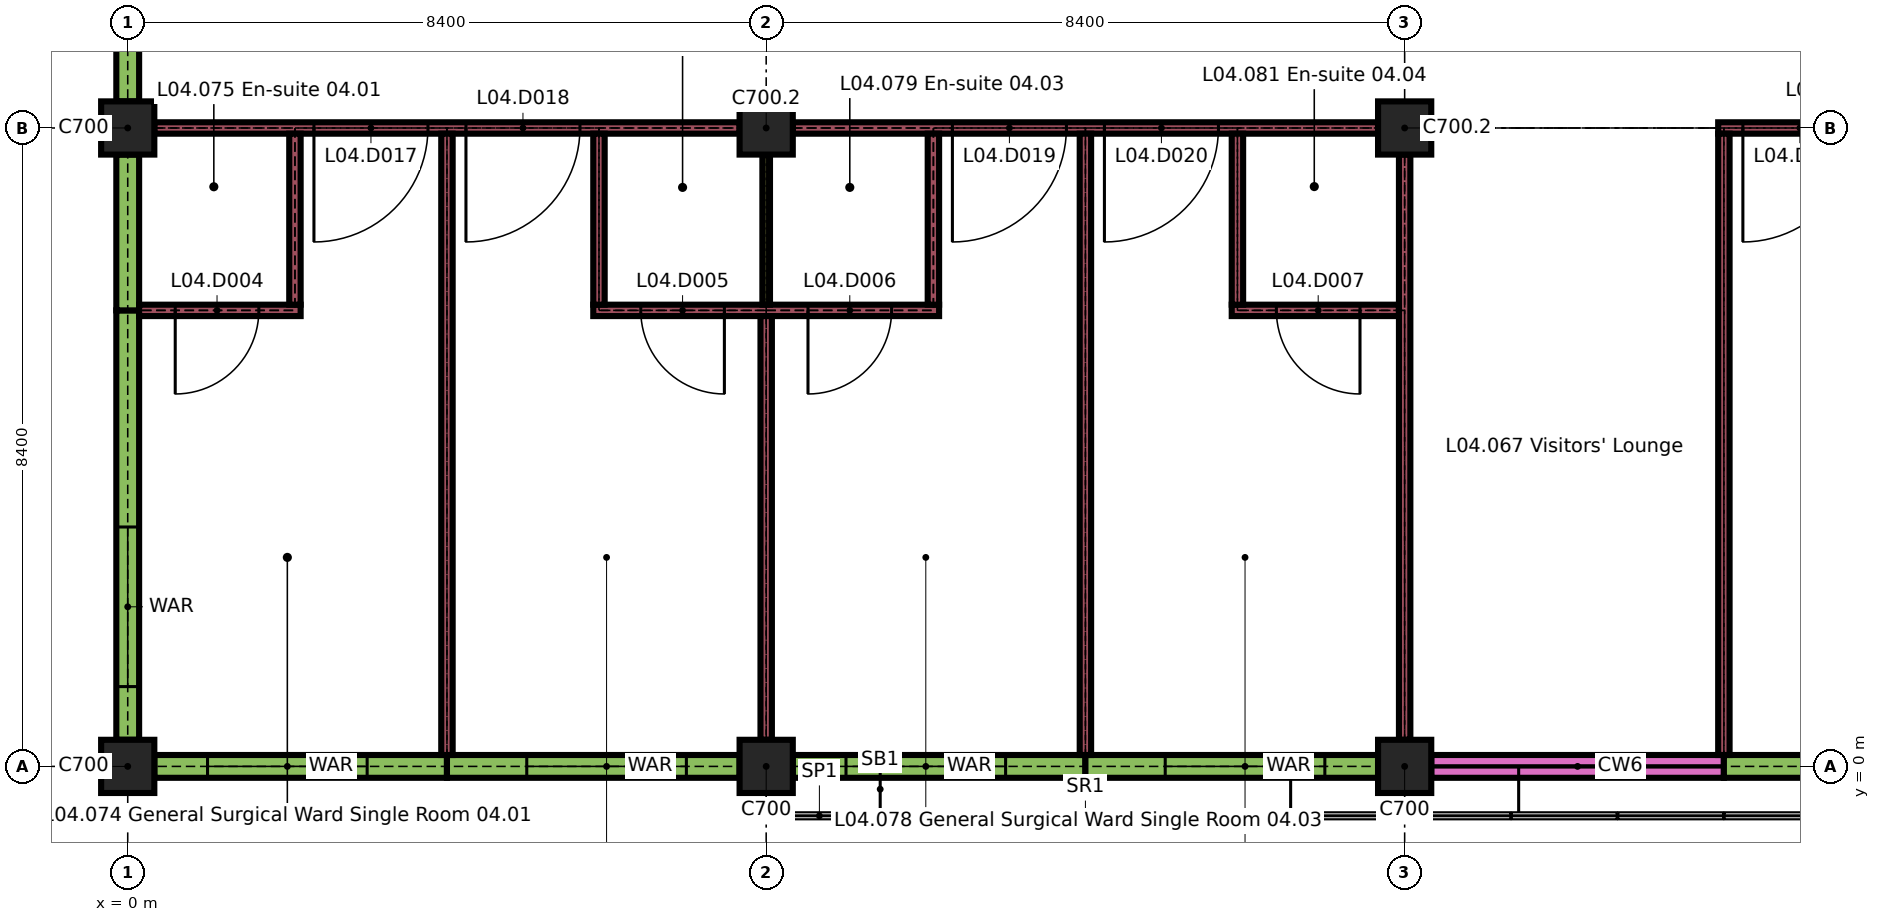
"""IFC4 building model, lengths in metres.
Left out: names, types, materials, properties, quantities, classifications, styles, units other than length and angle.
Written with IfcOpenShell. Run it as: python <this file> out.ifc"""

import sys

from ifc_helpers import new_model, si_unit, direction, frame, frame_2d, origin, origin_2d, place, context, subcontext, project, spatial, rectangle, extrude, element, fill, save


model = new_model("IFC4")
c1 = context("Model", 3, precision=1e-05, world=origin(), true_north=direction((0.0, 1.0)))
c2 = subcontext(c1, "Body", "Model", "MODEL_VIEW")
j1 = project(units=[si_unit("LENGTHUNIT", "METRE"), si_unit("PLANEANGLEUNIT", "RADIAN")], contexts=[c1])
p1 = place(None, origin())
s1 = spatial("IfcSite", under=j1, at=p1, CompositionType="ELEMENT")
p2 = place(p1, origin())
s2 = spatial("IfcBuilding", under=s1, at=p2, CompositionType="ELEMENT")
p3 = place(p2, frame((0.0, 0.0, 18.9)))
s3 = spatial("IfcBuildingStorey", under=s2, at=p3, CompositionType="ELEMENT", Elevation=18.9)
for number, where, z_axis, x_axis in (
    (1, (0.0, 0.0, 0.0), (0.0, 0.0, 1.0), (1.0, 0.0, 0.0)),
    (2, (8.4, 0.0, 0.0), (0.0, 0.0, 1.0), (1.0, 0.0, 0.0)),
    (3, (16.8, 0.0, 0.0), (0.0, 0.0, 1.0), (1.0, 0.0, 0.0)),
    (4, (0.0, 8.4, 0.0), (0.0, 0.0, 1.0), (1.0, 0.0, 0.0)),
    (5, (8.4, 8.4, 0.0), (0.0, 0.0, 1.0), (1.0, 0.0, 0.0)),
    (6, (16.8, 8.4, 0.0), (0.0, 0.0, 1.0), (1.0, 0.0, 0.0)),
):
    element("IfcColumn", number, at=place(p3, frame(where, z_axis=z_axis, x_axis=x_axis)), inside=s3, PredefinedType="COLUMN", context=c2, shape_type="SweptSolid", body=[
        extrude(rectangle(XDim=0.7, YDim=0.7, at=origin_2d()), origin(), (0.0, 0.0, 1.0), 3.26),
    ])
p4 = place(p3, frame((0.35, 0.0, 0.0), z_axis=(0.0, 0.0, 1.0), x_axis=(1.0, 0.0, 0.0)))
e7 = element("IfcWall", 7, at=p4, inside=s3, PredefinedType="SOLIDWALL", context=c2, shape_type="SweptSolid", body=[
    extrude(rectangle(XDim=3.85, YDim=0.3, at=frame_2d((1.925, 0.0))), origin(), (0.0, 0.0, 1.0), 2.96),
])
p5 = place(p4, frame((0.7, 0.0, 0.9)))
e8 = element("IfcOpeningElement", 8, at=p5, cuts=e7, PredefinedType="OPENING", context=c2, shape_type="SweptSolid", body=[
    extrude(rectangle(XDim=2.1, YDim=1.5, at=frame_2d((1.05, 0.75))), frame((0.0, 0.16, 0.0), z_axis=(0.0, -1.0, 0.0), x_axis=(1.0, 0.0, 0.0)), (0.0, 0.0, 1.0), 0.32),
])
p6 = place(p3, frame((4.2, 0.0, 0.0), z_axis=(0.0, 0.0, 1.0), x_axis=(1.0, 0.0, 0.0)))
e9 = element("IfcWall", 9, at=p6, inside=s3, PredefinedType="SOLIDWALL", context=c2, shape_type="SweptSolid", body=[
    extrude(rectangle(XDim=3.85, YDim=0.3, at=frame_2d((1.925, 0.0))), origin(), (0.0, 0.0, 1.0), 2.96),
])
p7 = place(p6, frame((1.05, 0.0, 0.9)))
e10 = element("IfcOpeningElement", 10, at=p7, cuts=e9, PredefinedType="OPENING", context=c2, shape_type="SweptSolid", body=[
    extrude(rectangle(XDim=2.1, YDim=1.5, at=frame_2d((1.05, 0.75))), frame((0.0, 0.16, 0.0), z_axis=(0.0, -1.0, 0.0), x_axis=(1.0, 0.0, 0.0)), (0.0, 0.0, 1.0), 0.32),
])
p8 = place(p3, frame((8.75, 0.0, 0.0), z_axis=(0.0, 0.0, 1.0), x_axis=(1.0, 0.0, 0.0)))
e11 = element("IfcWall", 11, at=p8, inside=s3, PredefinedType="SOLIDWALL", context=c2, shape_type="SweptSolid", body=[
    extrude(rectangle(XDim=3.85, YDim=0.3, at=frame_2d((1.925, 0.0))), origin(), (0.0, 0.0, 1.0), 2.96),
])
p9 = place(p8, frame((0.7, 0.0, 0.9)))
e12 = element("IfcOpeningElement", 12, at=p9, cuts=e11, PredefinedType="OPENING", context=c2, shape_type="SweptSolid", body=[
    extrude(rectangle(XDim=2.1, YDim=1.5, at=frame_2d((1.05, 0.75))), frame((0.0, 0.16, 0.0), z_axis=(0.0, -1.0, 0.0), x_axis=(1.0, 0.0, 0.0)), (0.0, 0.0, 1.0), 0.32),
])
p10 = place(p3, frame((12.6, 0.0, 0.0), z_axis=(0.0, 0.0, 1.0), x_axis=(1.0, 0.0, 0.0)))
e13 = element("IfcWall", 13, at=p10, inside=s3, PredefinedType="SOLIDWALL", context=c2, shape_type="SweptSolid", body=[
    extrude(rectangle(XDim=3.85, YDim=0.3, at=frame_2d((1.925, 0.0))), origin(), (0.0, 0.0, 1.0), 2.96),
])
p11 = place(p10, frame((1.05, 0.0, 0.9)))
e14 = element("IfcOpeningElement", 14, at=p11, cuts=e13, PredefinedType="OPENING", context=c2, shape_type="SweptSolid", body=[
    extrude(rectangle(XDim=2.1, YDim=1.5, at=frame_2d((1.05, 0.75))), frame((0.0, 0.16, 0.0), z_axis=(0.0, -1.0, 0.0), x_axis=(1.0, 0.0, 0.0)), (0.0, 0.0, 1.0), 0.32),
])
p12 = place(p3, frame((17.15, 0.0, 0.0), z_axis=(0.0, 0.0, 1.0), x_axis=(1.0, 0.0, 0.0)))
e15 = element("IfcWall", 15, at=p12, inside=s3, PredefinedType="SOLIDWALL", context=c2, shape_type="SweptSolid", body=[
    extrude(rectangle(XDim=3.85, YDim=0.3, at=frame_2d((1.925, 0.0))), origin(), (0.0, 0.0, 1.0), 0.6),
])
p13 = place(p3, frame((21.0, 0.0, 0.0), z_axis=(0.0, 0.0, 1.0), x_axis=(1.0, 0.0, 0.0)))
e16 = element("IfcWall", 16, at=p13, inside=s3, PredefinedType="SOLIDWALL", context=c2, shape_type="SweptSolid", body=[
    extrude(rectangle(XDim=3.85, YDim=0.3, at=frame_2d((1.925, 0.0))), origin(), (0.0, 0.0, 1.0), 2.96),
])
p14 = place(p13, frame((1.05, 0.0, 0.9)))
e17 = element("IfcOpeningElement", 17, at=p14, cuts=e16, PredefinedType="OPENING", context=c2, shape_type="SweptSolid", body=[
    extrude(rectangle(XDim=2.1, YDim=1.5, at=frame_2d((1.05, 0.75))), frame((0.0, 0.16, 0.0), z_axis=(0.0, -1.0, 0.0), x_axis=(1.0, 0.0, 0.0)), (0.0, 0.0, 1.0), 0.32),
])
p15 = place(p3, frame((0.0, 0.35, 0.0), z_axis=(0.0, 0.0, 1.0), x_axis=(0.0, 1.0, 0.0)))
e18 = element("IfcWall", 18, at=p15, inside=s3, PredefinedType="SOLIDWALL", context=c2, shape_type="SweptSolid", body=[
    extrude(rectangle(XDim=5.65, YDim=0.3, at=frame_2d((2.825, 0.0))), origin(), (0.0, 0.0, 1.0), 2.96),
])
p16 = place(p15, frame((0.7, 0.0, 0.9)))
e19 = element("IfcOpeningElement", 19, at=p16, cuts=e18, PredefinedType="OPENING", context=c2, shape_type="SweptSolid", body=[
    extrude(rectangle(XDim=2.1, YDim=1.5, at=frame_2d((1.05, 0.75))), frame((0.0, 0.16, 0.0), z_axis=(0.0, -1.0, 0.0), x_axis=(1.0, 0.0, 0.0)), (0.0, 0.0, 1.0), 0.32),
])
p17 = place(p3, frame((0.0, 6.0, 0.0), z_axis=(0.0, 0.0, 1.0), x_axis=(0.0, 1.0, 0.0)))
e20 = element("IfcWall", 20, at=p17, inside=s3, PredefinedType="SOLIDWALL", context=c2, shape_type="SweptSolid", body=[
    extrude(rectangle(XDim=2.05, YDim=0.3, at=frame_2d((1.025, 0.0))), origin(), (0.0, 0.0, 1.0), 2.96),
])
p18 = place(p3, frame((0.0, 8.75, 0.0), z_axis=(0.0, 0.0, 1.0), x_axis=(0.0, 1.0, 0.0)))
e21 = element("IfcWall", 21, at=p18, inside=s3, PredefinedType="SOLIDWALL", context=c2, shape_type="SweptSolid", body=[
    extrude(rectangle(XDim=2.65, YDim=0.3, at=frame_2d((1.325, 0.0))), origin(), (0.0, 0.0, 1.0), 2.96),
])
p19 = place(p18, frame((1.3, 0.0, 0.9)))
e22 = element("IfcOpeningElement", 22, at=p19, cuts=e21, PredefinedType="OPENING", context=c2, shape_type="SweptSolid", body=[
    extrude(rectangle(XDim=0.9, YDim=1.5, at=frame_2d((0.45, 0.75))), frame((0.0, 0.16, 0.0), z_axis=(0.0, -1.0, 0.0), x_axis=(1.0, 0.0, 0.0)), (0.0, 0.0, 1.0), 0.32),
])
p20 = place(p3, frame((0.15, 6.0, 0.0), z_axis=(0.0, 0.0, 1.0), x_axis=(1.0, 0.0, 0.0)))
e23 = element("IfcWall", 23, at=p20, inside=s3, PredefinedType="PARTITIONING", context=c2, shape_type="SweptSolid", body=[
    extrude(rectangle(XDim=2.125, YDim=0.15, at=frame_2d((1.062, 0.0))), origin(), (0.0, 0.0, 1.0), 3.26),
])
p21 = place(p20, frame((0.475, 0.0, 0.0)))
e24 = element("IfcOpeningElement", 24, at=p21, cuts=e23, PredefinedType="OPENING", context=c2, shape_type="SweptSolid", body=[
    extrude(rectangle(XDim=1.1, YDim=2.1, at=frame_2d((0.55, 1.05))), frame((0.0, 0.085, 0.0), z_axis=(0.0, -1.0, 0.0), x_axis=(1.0, 0.0, 0.0)), (0.0, 0.0, 1.0), 0.17),
])
p22 = place(p3, frame((6.125, 6.0, 0.0), z_axis=(0.0, 0.0, 1.0), x_axis=(1.0, 0.0, 0.0)))
e25 = element("IfcWall", 25, at=p22, inside=s3, PredefinedType="PARTITIONING", context=c2, shape_type="SweptSolid", body=[
    extrude(rectangle(XDim=4.55, YDim=0.15, at=frame_2d((2.275, 0.0))), origin(), (0.0, 0.0, 1.0), 3.26),
])
p23 = place(p22, frame((0.625, 0.0, 0.0)))
e26 = element("IfcOpeningElement", 26, at=p23, cuts=e25, PredefinedType="OPENING", context=c2, shape_type="SweptSolid", body=[
    extrude(rectangle(XDim=1.1, YDim=2.1, at=frame_2d((0.55, 1.05))), frame((0.0, 0.085, 0.0), z_axis=(0.0, -1.0, 0.0), x_axis=(1.0, 0.0, 0.0)), (0.0, 0.0, 1.0), 0.17),
])
p24 = place(p22, frame((2.825, 0.0, 0.0)))
e27 = element("IfcOpeningElement", 27, at=p24, cuts=e25, PredefinedType="OPENING", context=c2, shape_type="SweptSolid", body=[
    extrude(rectangle(XDim=1.1, YDim=2.1, at=frame_2d((0.55, 1.05))), frame((0.0, 0.085, 0.0), z_axis=(0.0, -1.0, 0.0), x_axis=(1.0, 0.0, 0.0)), (0.0, 0.0, 1.0), 0.17),
])
p25 = place(p3, frame((14.525, 6.0, 0.0), z_axis=(0.0, 0.0, 1.0), x_axis=(1.0, 0.0, 0.0)))
e28 = element("IfcWall", 28, at=p25, inside=s3, PredefinedType="PARTITIONING", context=c2, shape_type="SweptSolid", body=[
    extrude(rectangle(XDim=2.2, YDim=0.15, at=frame_2d((1.1, 0.0))), origin(), (0.0, 0.0, 1.0), 3.26),
])
p26 = place(p25, frame((0.587, 0.0, 0.0)))
e29 = element("IfcOpeningElement", 29, at=p26, cuts=e28, PredefinedType="OPENING", context=c2, shape_type="SweptSolid", body=[
    extrude(rectangle(XDim=1.1, YDim=2.1, at=frame_2d((0.55, 1.05))), frame((0.0, 0.085, 0.0), z_axis=(0.0, -1.0, 0.0), x_axis=(1.0, 0.0, 0.0)), (0.0, 0.0, 1.0), 0.17),
])
p27 = place(p3, frame((0.35, 8.4, 0.0), z_axis=(0.0, 0.0, 1.0), x_axis=(1.0, 0.0, 0.0)))
e30 = element("IfcWall", 30, at=p27, inside=s3, PredefinedType="PARTITIONING", context=c2, shape_type="SweptSolid", body=[
    extrude(rectangle(XDim=7.7, YDim=0.15, at=frame_2d((3.85, 0.0))), origin(), (0.0, 0.0, 1.0), 3.26),
])
p28 = place(p27, frame((2.1, 0.0, 0.0)))
e31 = element("IfcOpeningElement", 31, at=p28, cuts=e30, PredefinedType="OPENING", context=c2, shape_type="SweptSolid", body=[
    extrude(rectangle(XDim=1.5, YDim=2.4, at=frame_2d((0.75, 1.2))), frame((0.0, 0.085, 0.0), z_axis=(0.0, -1.0, 0.0), x_axis=(1.0, 0.0, 0.0)), (0.0, 0.0, 1.0), 0.17),
])
p29 = place(p27, frame((4.1, 0.0, 0.0)))
e32 = element("IfcOpeningElement", 32, at=p29, cuts=e30, PredefinedType="OPENING", context=c2, shape_type="SweptSolid", body=[
    extrude(rectangle(XDim=1.5, YDim=2.4, at=frame_2d((0.75, 1.2))), frame((0.0, 0.085, 0.0), z_axis=(0.0, -1.0, 0.0), x_axis=(1.0, 0.0, 0.0)), (0.0, 0.0, 1.0), 0.17),
])
p30 = place(p3, frame((8.75, 8.4, 0.0), z_axis=(0.0, 0.0, 1.0), x_axis=(1.0, 0.0, 0.0)))
e33 = element("IfcWall", 33, at=p30, inside=s3, PredefinedType="PARTITIONING", context=c2, shape_type="SweptSolid", body=[
    extrude(rectangle(XDim=7.7, YDim=0.15, at=frame_2d((3.85, 0.0))), origin(), (0.0, 0.0, 1.0), 3.26),
])
p31 = place(p30, frame((2.1, 0.0, 0.0)))
e34 = element("IfcOpeningElement", 34, at=p31, cuts=e33, PredefinedType="OPENING", context=c2, shape_type="SweptSolid", body=[
    extrude(rectangle(XDim=1.5, YDim=2.4, at=frame_2d((0.75, 1.2))), frame((0.0, 0.085, 0.0), z_axis=(0.0, -1.0, 0.0), x_axis=(1.0, 0.0, 0.0)), (0.0, 0.0, 1.0), 0.17),
])
p32 = place(p30, frame((4.1, 0.0, 0.0)))
e35 = element("IfcOpeningElement", 35, at=p32, cuts=e33, PredefinedType="OPENING", context=c2, shape_type="SweptSolid", body=[
    extrude(rectangle(XDim=1.5, YDim=2.4, at=frame_2d((0.75, 1.2))), frame((0.0, 0.085, 0.0), z_axis=(0.0, -1.0, 0.0), x_axis=(1.0, 0.0, 0.0)), (0.0, 0.0, 1.0), 0.17),
])
p33 = place(p3, frame((20.925, 8.4, 0.0), z_axis=(0.0, 0.0, 1.0), x_axis=(1.0, 0.0, 0.0)))
e36 = element("IfcWall", 36, at=p33, inside=s3, PredefinedType="PARTITIONING", context=c2, shape_type="SweptSolid", body=[
    extrude(rectangle(XDim=3.925, YDim=0.15, at=frame_2d((1.962, 0.0))), origin(), (0.0, 0.0, 1.0), 3.26),
])
p34 = place(p33, frame((0.325, 0.0, 0.0)))
e37 = element("IfcOpeningElement", 37, at=p34, cuts=e36, PredefinedType="OPENING", context=c2, shape_type="SweptSolid", body=[
    extrude(rectangle(XDim=1.5, YDim=2.4, at=frame_2d((0.75, 1.2))), frame((0.0, 0.085, 0.0), z_axis=(0.0, -1.0, 0.0), x_axis=(1.0, 0.0, 0.0)), (0.0, 0.0, 1.0), 0.17),
])
p35 = place(p3, frame((2.2, 6.075, 0.0), z_axis=(0.0, 0.0, 1.0), x_axis=(0.0, 1.0, 0.0)))
e38 = element("IfcWall", 38, at=p35, inside=s3, PredefinedType="PARTITIONING", context=c2, shape_type="SweptSolid", body=[
    extrude(rectangle(XDim=2.25, YDim=0.15, at=frame_2d((1.125, 0.0))), origin(), (0.0, 0.0, 1.0), 3.26),
])
p36 = place(p3, frame((4.2, 0.15, 0.0), z_axis=(0.0, 0.0, 1.0), x_axis=(0.0, 1.0, 0.0)))
e39 = element("IfcWall", 39, at=p36, inside=s3, PredefinedType="PARTITIONING", context=c2, shape_type="SweptSolid", body=[
    extrude(rectangle(XDim=8.175, YDim=0.15, at=frame_2d((4.087, 0.0))), origin(), (0.0, 0.0, 1.0), 3.26),
])
p37 = place(p3, frame((6.2, 6.075, 0.0), z_axis=(0.0, 0.0, 1.0), x_axis=(0.0, 1.0, 0.0)))
e40 = element("IfcWall", 40, at=p37, inside=s3, PredefinedType="PARTITIONING", context=c2, shape_type="SweptSolid", body=[
    extrude(rectangle(XDim=2.25, YDim=0.15, at=frame_2d((1.125, 0.0))), origin(), (0.0, 0.0, 1.0), 3.26),
])
p38 = place(p3, frame((8.4, 0.35, 0.0), z_axis=(0.0, 0.0, 1.0), x_axis=(0.0, 1.0, 0.0)))
e41 = element("IfcWall", 41, at=p38, inside=s3, PredefinedType="PARTITIONING", context=c2, shape_type="SweptSolid", body=[
    extrude(rectangle(XDim=5.575, YDim=0.15, at=frame_2d((2.788, 0.0))), origin(), (0.0, 0.0, 1.0), 3.26),
])
p39 = place(p3, frame((8.4, 6.075, 0.0), z_axis=(0.0, 0.0, 1.0), x_axis=(0.0, 1.0, 0.0)))
e42 = element("IfcWall", 42, at=p39, inside=s3, PredefinedType="PARTITIONING", context=c2, shape_type="SweptSolid", body=[
    extrude(rectangle(XDim=1.975, YDim=0.1, at=frame_2d((0.988, 0.0))), origin(), (0.0, 0.0, 1.0), 3.26),
])
p40 = place(p3, frame((10.6, 6.075, 0.0), z_axis=(0.0, 0.0, 1.0), x_axis=(0.0, 1.0, 0.0)))
e43 = element("IfcWall", 43, at=p40, inside=s3, PredefinedType="PARTITIONING", context=c2, shape_type="SweptSolid", body=[
    extrude(rectangle(XDim=2.25, YDim=0.15, at=frame_2d((1.125, 0.0))), origin(), (0.0, 0.0, 1.0), 3.26),
])
p41 = place(p3, frame((12.6, 0.15, 0.0), z_axis=(0.0, 0.0, 1.0), x_axis=(0.0, 1.0, 0.0)))
e44 = element("IfcWall", 44, at=p41, inside=s3, PredefinedType="PARTITIONING", context=c2, shape_type="SweptSolid", body=[
    extrude(rectangle(XDim=8.175, YDim=0.15, at=frame_2d((4.087, 0.0))), origin(), (0.0, 0.0, 1.0), 3.26),
])
p42 = place(p3, frame((14.6, 6.075, 0.0), z_axis=(0.0, 0.0, 1.0), x_axis=(0.0, 1.0, 0.0)))
e45 = element("IfcWall", 45, at=p42, inside=s3, PredefinedType="PARTITIONING", context=c2, shape_type="SweptSolid", body=[
    extrude(rectangle(XDim=2.25, YDim=0.15, at=frame_2d((1.125, 0.0))), origin(), (0.0, 0.0, 1.0), 3.26),
])
p43 = place(p3, frame((16.8, 0.35, 0.0), z_axis=(0.0, 0.0, 1.0), x_axis=(0.0, 1.0, 0.0)))
e46 = element("IfcWall", 46, at=p43, inside=s3, PredefinedType="PARTITIONING", context=c2, shape_type="SweptSolid", body=[
    extrude(rectangle(XDim=7.7, YDim=0.15, at=frame_2d((3.85, 0.0))), origin(), (0.0, 0.0, 1.0), 3.26),
])
p44 = place(p3, frame((21.0, 0.15, 0.0), z_axis=(0.0, 0.0, 1.0), x_axis=(0.0, 1.0, 0.0)))
e47 = element("IfcWall", 47, at=p44, inside=s3, PredefinedType="PARTITIONING", context=c2, shape_type="SweptSolid", body=[
    extrude(rectangle(XDim=8.175, YDim=0.15, at=frame_2d((4.087, 0.0))), origin(), (0.0, 0.0, 1.0), 3.26),
])
p45 = place(p5, origin())
e48 = element("IfcWindow", 48, at=p45, inside=s3, PartitioningType="DOUBLE_PANEL_VERTICAL", PredefinedType="WINDOW", context=c2, shape_type="SweptSolid", body=[
    extrude(rectangle(XDim=2.1, YDim=1.5, at=frame_2d((1.05, 0.75))), frame((0.0, 0.05, 0.0), z_axis=(0.0, -1.0, 0.0), x_axis=(1.0, 0.0, 0.0)), (0.0, 0.0, 1.0), 0.1),
])
fill(e8, e48)
p46 = place(p7, origin())
e49 = element("IfcWindow", 49, at=p46, inside=s3, PartitioningType="DOUBLE_PANEL_VERTICAL", PredefinedType="WINDOW", context=c2, shape_type="SweptSolid", body=[
    extrude(rectangle(XDim=2.1, YDim=1.5, at=frame_2d((1.05, 0.75))), frame((0.0, 0.05, 0.0), z_axis=(0.0, -1.0, 0.0), x_axis=(1.0, 0.0, 0.0)), (0.0, 0.0, 1.0), 0.1),
])
fill(e10, e49)
p47 = place(p9, origin())
e50 = element("IfcWindow", 50, at=p47, inside=s3, PartitioningType="DOUBLE_PANEL_VERTICAL", PredefinedType="WINDOW", context=c2, shape_type="SweptSolid", body=[
    extrude(rectangle(XDim=2.1, YDim=1.5, at=frame_2d((1.05, 0.75))), frame((0.0, 0.05, 0.0), z_axis=(0.0, -1.0, 0.0), x_axis=(1.0, 0.0, 0.0)), (0.0, 0.0, 1.0), 0.1),
])
fill(e12, e50)
p48 = place(p11, origin())
e51 = element("IfcWindow", 51, at=p48, inside=s3, PartitioningType="DOUBLE_PANEL_VERTICAL", PredefinedType="WINDOW", context=c2, shape_type="SweptSolid", body=[
    extrude(rectangle(XDim=2.1, YDim=1.5, at=frame_2d((1.05, 0.75))), frame((0.0, 0.05, 0.0), z_axis=(0.0, -1.0, 0.0), x_axis=(1.0, 0.0, 0.0)), (0.0, 0.0, 1.0), 0.1),
])
fill(e14, e51)
p49 = place(p16, origin())
e52 = element("IfcWindow", 52, at=p49, inside=s3, PartitioningType="DOUBLE_PANEL_VERTICAL", PredefinedType="WINDOW", context=c2, shape_type="SweptSolid", body=[
    extrude(rectangle(XDim=2.1, YDim=1.5, at=frame_2d((1.05, 0.75))), frame((0.0, 0.05, 0.0), z_axis=(0.0, -1.0, 0.0), x_axis=(1.0, 0.0, 0.0)), (0.0, 0.0, 1.0), 0.1),
])
fill(e19, e52)
p50 = place(p21, origin())
e53 = element("IfcDoor", 53, at=p50, inside=s3, OperationType="SINGLE_SWING_LEFT", PredefinedType="DOOR", context=c2, shape_type="SweptSolid", body=[
    extrude(rectangle(XDim=1.1, YDim=2.1, at=frame_2d((0.55, 1.05))), frame((0.0, 0.025, 0.0), z_axis=(0.0, -1.0, 0.0), x_axis=(1.0, 0.0, 0.0)), (0.0, 0.0, 1.0), 0.05),
])
fill(e24, e53)
p51 = place(p23, origin())
e54 = element("IfcDoor", 54, at=p51, inside=s3, OperationType="SINGLE_SWING_RIGHT", PredefinedType="DOOR", context=c2, shape_type="SweptSolid", body=[
    extrude(rectangle(XDim=1.1, YDim=2.1, at=frame_2d((0.55, 1.05))), frame((0.0, 0.025, 0.0), z_axis=(0.0, -1.0, 0.0), x_axis=(1.0, 0.0, 0.0)), (0.0, 0.0, 1.0), 0.05),
])
fill(e26, e54)
p52 = place(p24, origin())
e55 = element("IfcDoor", 55, at=p52, inside=s3, OperationType="SINGLE_SWING_LEFT", PredefinedType="DOOR", context=c2, shape_type="SweptSolid", body=[
    extrude(rectangle(XDim=1.1, YDim=2.1, at=frame_2d((0.55, 1.05))), frame((0.0, 0.025, 0.0), z_axis=(0.0, -1.0, 0.0), x_axis=(1.0, 0.0, 0.0)), (0.0, 0.0, 1.0), 0.05),
])
fill(e27, e55)
p53 = place(p26, origin())
e56 = element("IfcDoor", 56, at=p53, inside=s3, OperationType="SINGLE_SWING_RIGHT", PredefinedType="DOOR", context=c2, shape_type="SweptSolid", body=[
    extrude(rectangle(XDim=1.1, YDim=2.1, at=frame_2d((0.55, 1.05))), frame((0.0, 0.025, 0.0), z_axis=(0.0, -1.0, 0.0), x_axis=(1.0, 0.0, 0.0)), (0.0, 0.0, 1.0), 0.05),
])
fill(e29, e56)
p54 = place(p28, origin())
e57 = element("IfcDoor", 57, at=p54, inside=s3, OperationType="SINGLE_SWING_LEFT", PredefinedType="DOOR", context=c2, shape_type="SweptSolid", body=[
    extrude(rectangle(XDim=1.5, YDim=2.4, at=frame_2d((0.75, 1.2))), frame((0.0, 0.03, 0.0), z_axis=(0.0, -1.0, 0.0), x_axis=(1.0, 0.0, 0.0)), (0.0, 0.0, 1.0), 0.06),
])
fill(e31, e57)
p55 = place(p29, origin())
e58 = element("IfcDoor", 58, at=p55, inside=s3, OperationType="SINGLE_SWING_LEFT", PredefinedType="DOOR", context=c2, shape_type="SweptSolid", body=[
    extrude(rectangle(XDim=1.5, YDim=2.4, at=frame_2d((0.75, 1.2))), frame((0.0, 0.03, 0.0), z_axis=(0.0, -1.0, 0.0), x_axis=(1.0, 0.0, 0.0)), (0.0, 0.0, 1.0), 0.06),
])
fill(e32, e58)
p56 = place(p31, origin())
e59 = element("IfcDoor", 59, at=p56, inside=s3, OperationType="SINGLE_SWING_LEFT", PredefinedType="DOOR", context=c2, shape_type="SweptSolid", body=[
    extrude(rectangle(XDim=1.5, YDim=2.4, at=frame_2d((0.75, 1.2))), frame((0.0, 0.03, 0.0), z_axis=(0.0, -1.0, 0.0), x_axis=(1.0, 0.0, 0.0)), (0.0, 0.0, 1.0), 0.06),
])
fill(e34, e59)
p57 = place(p32, origin())
e60 = element("IfcDoor", 60, at=p57, inside=s3, OperationType="SINGLE_SWING_LEFT", PredefinedType="DOOR", context=c2, shape_type="SweptSolid", body=[
    extrude(rectangle(XDim=1.5, YDim=2.4, at=frame_2d((0.75, 1.2))), frame((0.0, 0.03, 0.0), z_axis=(0.0, -1.0, 0.0), x_axis=(1.0, 0.0, 0.0)), (0.0, 0.0, 1.0), 0.06),
])
fill(e35, e60)
p58 = place(p34, origin())
e61 = element("IfcDoor", 61, at=p58, inside=s3, OperationType="SINGLE_SWING_LEFT", PredefinedType="DOOR", context=c2, shape_type="SweptSolid", body=[
    extrude(rectangle(XDim=1.5, YDim=2.4, at=frame_2d((0.75, 1.2))), frame((0.0, 0.03, 0.0), z_axis=(0.0, -1.0, 0.0), x_axis=(1.0, 0.0, 0.0)), (0.0, 0.0, 1.0), 0.06),
])
fill(e37, e61)
save(model, sys.argv[1])
